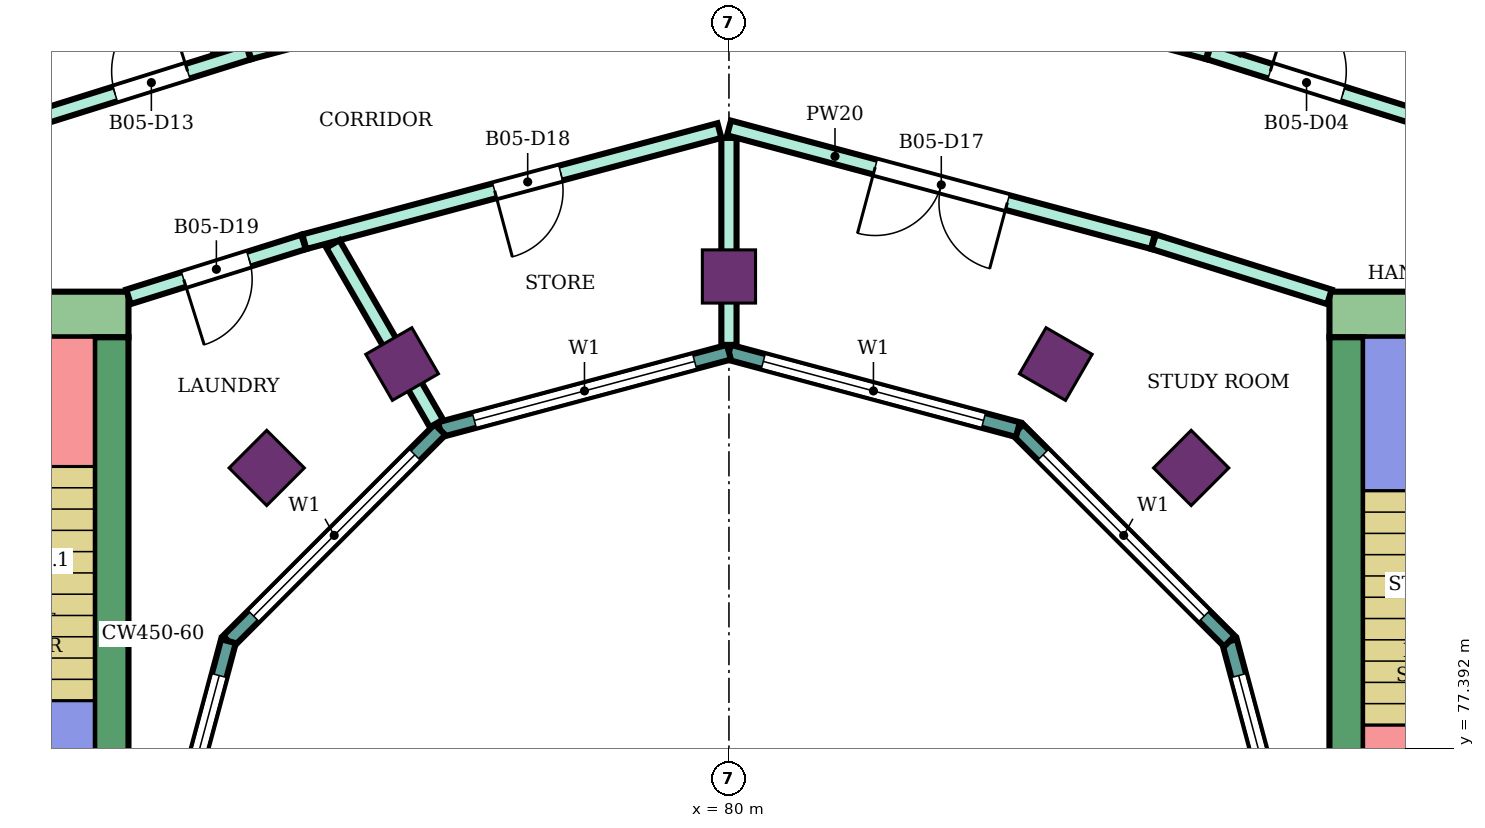
"""IFC4 building model, lengths in metres.
Left out: names, types, materials, properties, quantities, classifications, styles, units other than length and angle.
Written with IfcOpenShell. Run it as: python <this file> out.ifc"""

import sys

from ifc_helpers import new_model, si_unit, direction, frame, frame_2d, origin, origin_2d, place, context, subcontext, project, spatial, rectangle, extrude, element, fill, save


model = new_model("IFC4")
c1 = context("Model", 3, precision=1e-05, world=origin(), true_north=direction((0.0, 1.0)))
c2 = subcontext(c1, "Body", "Model", "MODEL_VIEW")
j1 = project(units=[si_unit("LENGTHUNIT", "METRE"), si_unit("PLANEANGLEUNIT", "RADIAN")], contexts=[c1])
p1 = place(None, origin())
s1 = spatial("IfcSite", under=j1, at=p1, CompositionType="ELEMENT")
p2 = place(p1, origin())
s2 = spatial("IfcBuilding", under=s1, at=p2, CompositionType="ELEMENT")
p3 = place(p2, frame((0.0, 0.0, 262.5)))
s3 = spatial("IfcBuildingStorey", under=s2, at=p3, CompositionType="ELEMENT", Elevation=262.5)
for number, where, z_axis, x_axis in (
    (1, (86.081, 81.081, 0.0), (0.0, 0.0, 1.0), (0.707, 0.707, 0.0)),
    (2, (84.3, 82.448, 0.0), (0.0, 0.0, 1.0), (0.5, 0.866, 0.0)),
    (3, (80.0, 83.6, 0.0), (0.0, 0.0, 1.0), (0.0, 1.0, 0.0)),
    (4, (75.7, 82.448, 0.0), (0.0, 0.0, 1.0), (-0.5, 0.866, 0.0)),
    (5, (73.919, 81.081, 0.0), (0.0, 0.0, 1.0), (-0.707, 0.707, 0.0)),
):
    element("IfcColumn", number, at=place(p3, frame(where, z_axis=z_axis, x_axis=x_axis)), inside=s3, PredefinedType="COLUMN", context=c2, shape_type="SweptSolid", body=[
        extrude(rectangle(XDim=0.7, YDim=0.7, at=origin_2d()), origin(), (0.0, 0.0, 1.0), 4.2),
    ])
p4 = place(p3, frame((87.9, 83.1, 0.0), z_axis=(0.0, 0.0, 1.0), x_axis=(1.0, 0.0, 0.0)))
e6 = element("IfcWall", 6, at=p4, inside=s3, PredefinedType="SHEAR", context=c2, shape_type="SweptSolid", body=[
    extrude(rectangle(XDim=14.9, YDim=0.6, at=frame_2d((7.45, 0.0))), origin(), (0.0, 0.0, 1.0), 3.88),
])
p5 = place(p4, frame((4.2, 0.0, 0.0)))
e7 = element("IfcOpeningElement", 7, at=p5, cuts=e6, PredefinedType="OPENING", context=c2, shape_type="SweptSolid", body=[
    extrude(rectangle(XDim=2.4, YDim=2.4, at=frame_2d((1.2, 1.2))), frame((0.0, 0.31, 0.0), z_axis=(0.0, -1.0, 0.0), x_axis=(1.0, 0.0, 0.0)), (0.0, 0.0, 1.0), 0.62),
])
p6 = place(p3, frame((88.125, 75.0, 0.0), z_axis=(0.0, 0.0, 1.0), x_axis=(0.0, 1.0, 0.0)))
e8 = element("IfcWall", 8, at=p6, inside=s3, PredefinedType="SHEAR", context=c2, shape_type="SweptSolid", body=[
    extrude(rectangle(XDim=7.8, YDim=0.45, at=frame_2d((3.9, 0.0))), origin(), (0.0, 0.0, 1.0), 3.88),
])
p7 = place(p3, frame((72.1, 83.1, 0.0), z_axis=(0.0, 0.0, 1.0), x_axis=(-1.0, 0.0, 0.0)))
e9 = element("IfcWall", 9, at=p7, inside=s3, PredefinedType="SHEAR", context=c2, shape_type="SweptSolid", body=[
    extrude(rectangle(XDim=14.9, YDim=0.6, at=frame_2d((7.45, 0.0))), origin(), (0.0, 0.0, 1.0), 3.88),
])
p8 = place(p7, frame((4.2, 0.0, 0.0)))
e10 = element("IfcOpeningElement", 10, at=p8, cuts=e9, PredefinedType="OPENING", context=c2, shape_type="SweptSolid", body=[
    extrude(rectangle(XDim=2.4, YDim=2.4, at=frame_2d((1.2, 1.2))), frame((0.0, 0.31, 0.0), z_axis=(0.0, -1.0, 0.0), x_axis=(1.0, 0.0, 0.0)), (0.0, 0.0, 1.0), 0.62),
])
p9 = place(p3, frame((71.875, 82.8, 0.0), z_axis=(0.0, 0.0, 1.0), x_axis=(0.0, -1.0, 0.0)))
e11 = element("IfcWall", 11, at=p9, inside=s3, PredefinedType="SHEAR", context=c2, shape_type="SweptSolid", body=[
    extrude(rectangle(XDim=7.8, YDim=0.45, at=frame_2d((3.9, 0.0))), origin(), (0.0, 0.0, 1.0), 3.88),
])
p10 = place(p3, frame((87.604, 75.0, 0.0), z_axis=(0.0, 0.0, 1.0), x_axis=(-0.258789828301, 0.965933654434, 0.0)))
e12 = element("IfcWall", 12, at=p10, inside=s3, PredefinedType="NOTDEFINED", context=c2, shape_type="SweptSolid", body=[
    extrude(rectangle(XDim=3.936, YDim=0.2, at=frame_2d((1.968, 0.0))), origin(), (0.0, 0.0, 1.0), 4.2),
])
p11 = place(p10, frame((0.468, 0.0, 0.9)))
e13 = element("IfcOpeningElement", 13, at=p11, cuts=e12, PredefinedType="OPENING", context=c2, shape_type="SweptSolid", body=[
    extrude(rectangle(XDim=3.0, YDim=2.3, at=frame_2d((1.5, 1.15))), frame((0.0, 0.11, 0.0), z_axis=(0.0, -1.0, 0.0), x_axis=(1.0, 0.0, 0.0)), (0.0, 0.0, 1.0), 0.22),
])
p12 = place(p3, frame((86.585, 78.802, 0.0), z_axis=(0.0, 0.0, 1.0), x_axis=(-0.707106781187, 0.707106781187, 0.0)))
e14 = element("IfcWall", 14, at=p12, inside=s3, PredefinedType="NOTDEFINED", context=c2, shape_type="SweptSolid", body=[
    extrude(rectangle(XDim=3.936, YDim=0.2, at=frame_2d((1.968, 0.0))), origin(), (0.0, 0.0, 1.0), 4.2),
])
p13 = place(p12, frame((0.468, 0.0, 0.9)))
e15 = element("IfcOpeningElement", 15, at=p13, cuts=e14, PredefinedType="OPENING", context=c2, shape_type="SweptSolid", body=[
    extrude(rectangle(XDim=3.0, YDim=2.3, at=frame_2d((1.5, 1.15))), frame((0.0, 0.11, 0.0), z_axis=(0.0, -1.0, 0.0), x_axis=(1.0, 0.0, 0.0)), (0.0, 0.0, 1.0), 0.22),
])
p14 = place(p3, frame((83.802, 81.585, 0.0), z_axis=(0.0, 0.0, 1.0), x_axis=(-0.965933654434, 0.258789828301, 0.0)))
e16 = element("IfcWall", 16, at=p14, inside=s3, PredefinedType="NOTDEFINED", context=c2, shape_type="SweptSolid", body=[
    extrude(rectangle(XDim=3.936, YDim=0.2, at=frame_2d((1.968, 0.0))), origin(), (0.0, 0.0, 1.0), 4.2),
])
p15 = place(p14, frame((0.468, 0.0, 0.9)))
e17 = element("IfcOpeningElement", 17, at=p15, cuts=e16, PredefinedType="OPENING", context=c2, shape_type="SweptSolid", body=[
    extrude(rectangle(XDim=3.0, YDim=2.3, at=frame_2d((1.5, 1.15))), frame((0.0, 0.11, 0.0), z_axis=(0.0, -1.0, 0.0), x_axis=(1.0, 0.0, 0.0)), (0.0, 0.0, 1.0), 0.22),
])
p16 = place(p3, frame((80.0, 82.604, 0.0), z_axis=(0.0, 0.0, 1.0), x_axis=(-0.965933654434, -0.258789828301, 0.0)))
e18 = element("IfcWall", 18, at=p16, inside=s3, PredefinedType="NOTDEFINED", context=c2, shape_type="SweptSolid", body=[
    extrude(rectangle(XDim=3.936, YDim=0.2, at=frame_2d((1.968, 0.0))), origin(), (0.0, 0.0, 1.0), 4.2),
])
p17 = place(p16, frame((0.468, 0.0, 0.9)))
e19 = element("IfcOpeningElement", 19, at=p17, cuts=e18, PredefinedType="OPENING", context=c2, shape_type="SweptSolid", body=[
    extrude(rectangle(XDim=3.0, YDim=2.3, at=frame_2d((1.5, 1.15))), frame((0.0, 0.11, 0.0), z_axis=(0.0, -1.0, 0.0), x_axis=(1.0, 0.0, 0.0)), (0.0, 0.0, 1.0), 0.22),
])
p18 = place(p3, frame((76.198, 81.585, 0.0), z_axis=(0.0, 0.0, 1.0), x_axis=(-0.707106781187, -0.707106781187, 0.0)))
e20 = element("IfcWall", 20, at=p18, inside=s3, PredefinedType="NOTDEFINED", context=c2, shape_type="SweptSolid", body=[
    extrude(rectangle(XDim=3.936, YDim=0.2, at=frame_2d((1.968, 0.0))), origin(), (0.0, 0.0, 1.0), 4.2),
])
p19 = place(p18, frame((0.468, 0.0, 0.9)))
e21 = element("IfcOpeningElement", 21, at=p19, cuts=e20, PredefinedType="OPENING", context=c2, shape_type="SweptSolid", body=[
    extrude(rectangle(XDim=3.0, YDim=2.3, at=frame_2d((1.5, 1.15))), frame((0.0, 0.11, 0.0), z_axis=(0.0, -1.0, 0.0), x_axis=(1.0, 0.0, 0.0)), (0.0, 0.0, 1.0), 0.22),
])
p20 = place(p3, frame((73.415, 78.802, 0.0), z_axis=(0.0, 0.0, 1.0), x_axis=(-0.258789828301, -0.965933654434, 0.0)))
e22 = element("IfcWall", 22, at=p20, inside=s3, PredefinedType="NOTDEFINED", context=c2, shape_type="SweptSolid", body=[
    extrude(rectangle(XDim=3.936, YDim=0.2, at=frame_2d((1.968, 0.0))), origin(), (0.0, 0.0, 1.0), 4.2),
])
p21 = place(p20, frame((0.468, 0.0, 0.9)))
e23 = element("IfcOpeningElement", 23, at=p21, cuts=e22, PredefinedType="OPENING", context=c2, shape_type="SweptSolid", body=[
    extrude(rectangle(XDim=3.0, YDim=2.3, at=frame_2d((1.5, 1.15))), frame((0.0, 0.11, 0.0), z_axis=(0.0, -1.0, 0.0), x_axis=(1.0, 0.0, 0.0)), (0.0, 0.0, 1.0), 0.22),
])
p22 = place(p3, frame((67.104, 97.343, 0.0), z_axis=(0.0, 0.0, 1.0), x_axis=(0.499894524629, -0.866086291455, 0.0)))
e24 = element("IfcWall", 24, at=p22, inside=s3, PredefinedType="PARTITIONING", context=c2, shape_type="SweptSolid", body=[
    extrude(rectangle(XDim=12.446, YDim=0.2, at=frame_2d((6.223, 0.0))), origin(), (0.0, 0.0, 1.0), 3.75),
])
p23 = place(p3, frame((68.2, 84.833, 0.0), z_axis=(0.0, 0.0, 1.0), x_axis=(0.954204109499, 0.299156342762, 0.0)))
e25 = element("IfcWall", 25, at=p23, inside=s3, PredefinedType="PARTITIONING", context=c2, shape_type="SweptSolid", body=[
    extrude(rectangle(XDim=5.74, YDim=0.2, at=frame_2d((2.87, 0.0))), origin(), (0.0, 0.0, 1.0), 3.75),
])
p24 = place(p23, frame((3.903, 0.0, 0.0)))
e26 = element("IfcOpeningElement", 26, at=p24, cuts=e25, PredefinedType="OPENING", context=c2, shape_type="SweptSolid", body=[
    extrude(rectangle(XDim=1.0, YDim=2.1, at=frame_2d((0.5, 1.05))), frame((0.0, 0.11, 0.0), z_axis=(0.0, -1.0, 0.0), x_axis=(1.0, 0.0, 0.0)), (0.0, 0.0, 1.0), 0.22),
])
p25 = place(p3, frame((72.1, 83.332, 0.0), z_axis=(0.0, 0.0, 1.0), x_axis=(0.954233106619, 0.299063836383, 0.0)))
e27 = element("IfcWall", 27, at=p25, inside=s3, PredefinedType="PARTITIONING", context=c2, shape_type="SweptSolid", body=[
    extrude(rectangle(XDim=2.414, YDim=0.2, at=frame_2d((1.207, 0.0))), origin(), (0.0, 0.0, 1.0), 3.75),
])
p26 = place(p25, frame((0.762, 0.0, 0.0)))
e28 = element("IfcOpeningElement", 28, at=p26, cuts=e27, PredefinedType="OPENING", context=c2, shape_type="SweptSolid", body=[
    extrude(rectangle(XDim=0.9, YDim=2.1, at=frame_2d((0.45, 1.05))), frame((0.0, 0.11, 0.0), z_axis=(0.0, -1.0, 0.0), x_axis=(1.0, 0.0, 0.0)), (0.0, 0.0, 1.0), 0.22),
])
p27 = place(p3, frame((73.687, 86.554, 0.0), z_axis=(0.0, 0.0, 1.0), x_axis=(0.965961994098, 0.258684027257, 0.0)))
e29 = element("IfcWall", 29, at=p27, inside=s3, PredefinedType="PARTITIONING", context=c2, shape_type="SweptSolid", body=[
    extrude(rectangle(XDim=6.486, YDim=0.2, at=frame_2d((3.243, 0.0))), origin(), (0.0, 0.0, 1.0), 3.75),
])
p28 = place(p3, frame((74.413, 84.057, 0.0), z_axis=(0.0, 0.0, 1.0), x_axis=(0.965972135939, 0.258646153246, 0.0)))
e30 = element("IfcWall", 30, at=p28, inside=s3, PredefinedType="PARTITIONING", context=c2, shape_type="SweptSolid", body=[
    extrude(rectangle(XDim=5.654, YDim=0.2, at=frame_2d((2.827, 0.0))), origin(), (0.0, 0.0, 1.0), 3.75),
])
p29 = place(p28, frame((2.593, 0.0, 0.0)))
e31 = element("IfcOpeningElement", 31, at=p29, cuts=e30, PredefinedType="OPENING", context=c2, shape_type="SweptSolid", body=[
    extrude(rectangle(XDim=0.9, YDim=2.1, at=frame_2d((0.45, 1.05))), frame((0.0, 0.11, 0.0), z_axis=(0.0, -1.0, 0.0), x_axis=(1.0, 0.0, 0.0)), (0.0, 0.0, 1.0), 0.22),
])
p30 = place(p3, frame((74.789, 84.028, 0.0), z_axis=(0.0, 0.0, 1.0), x_axis=(0.499905962189, -0.866079689733, 0.0)))
e32 = element("IfcWall", 32, at=p30, inside=s3, PredefinedType="PARTITIONING", context=c2, shape_type="SweptSolid", body=[
    extrude(rectangle(XDim=2.726, YDim=0.2, at=frame_2d((1.363, 0.0))), origin(), (0.0, 0.0, 1.0), 3.75),
])
p31 = place(p3, frame((80.0, 82.7, 0.0), z_axis=(0.0, 0.0, 1.0), x_axis=(0.0, 1.0, 0.0)))
e33 = element("IfcWall", 33, at=p31, inside=s3, PredefinedType="PARTITIONING", context=c2, shape_type="SweptSolid", body=[
    extrude(rectangle(XDim=2.723, YDim=0.2, at=frame_2d((1.362, 0.0))), origin(), (0.0, 0.0, 1.0), 3.75),
])
p32 = place(p3, frame((80.048, 88.233, 0.0), z_axis=(0.0, 0.0, 1.0), x_axis=(0.965867917069, -0.259035068625, 0.0)))
e34 = element("IfcWall", 34, at=p32, inside=s3, PredefinedType="PARTITIONING", context=c2, shape_type="SweptSolid", body=[
    extrude(rectangle(XDim=6.476, YDim=0.2, at=frame_2d((3.238, 0.0))), origin(), (0.0, 0.0, 1.0), 3.75),
])
p33 = place(p32, frame((0.5, 0.0, 0.0)))
e35 = element("IfcOpeningElement", 35, at=p33, cuts=e34, PredefinedType="OPENING", context=c2, shape_type="SweptSolid", body=[
    extrude(rectangle(XDim=1.0, YDim=2.1, at=frame_2d((0.5, 1.05))), frame((0.0, 0.11, 0.0), z_axis=(0.0, -1.0, 0.0), x_axis=(1.0, 0.0, 0.0)), (0.0, 0.0, 1.0), 0.22),
])
p34 = place(p3, frame((80.001, 85.554, 0.0), z_axis=(0.0, 0.0, 1.0), x_axis=(0.965917658836, -0.258849524528, 0.0)))
e36 = element("IfcWall", 36, at=p34, inside=s3, PredefinedType="PARTITIONING", context=c2, shape_type="SweptSolid", body=[
    extrude(rectangle(XDim=5.773, YDim=0.2, at=frame_2d((2.887, 0.0))), origin(), (0.0, 0.0, 1.0), 3.75),
])
p35 = place(p34, frame((1.991, 0.0, 0.0)))
e37 = element("IfcOpeningElement", 37, at=p35, cuts=e36, PredefinedType="OPENING", context=c2, shape_type="SweptSolid", body=[
    extrude(rectangle(XDim=1.8, YDim=2.1, at=frame_2d((0.9, 1.05))), frame((0.0, 0.11, 0.0), z_axis=(0.0, -1.0, 0.0), x_axis=(1.0, 0.0, 0.0)), (0.0, 0.0, 1.0), 0.22),
])
p36 = place(p3, frame((85.587, 84.057, 0.0), z_axis=(0.0, 0.0, 1.0), x_axis=(0.954210767728, -0.299135104513, 0.0)))
e38 = element("IfcWall", 38, at=p36, inside=s3, PredefinedType="PARTITIONING", context=c2, shape_type="SweptSolid", body=[
    extrude(rectangle(XDim=2.424, YDim=0.2, at=frame_2d((1.212, 0.0))), origin(), (0.0, 0.0, 1.0), 3.75),
])
p37 = place(p3, frame((86.313, 86.554, 0.0), z_axis=(0.0, 0.0, 1.0), x_axis=(0.954081217458, -0.299548043717, 0.0)))
e39 = element("IfcWall", 39, at=p37, inside=s3, PredefinedType="PARTITIONING", context=c2, shape_type="SweptSolid", body=[
    extrude(rectangle(XDim=5.721, YDim=0.2, at=frame_2d((2.86, 0.0))), origin(), (0.0, 0.0, 1.0), 3.75),
])
p38 = place(p37, frame((0.848, 0.0, 0.0)))
e40 = element("IfcOpeningElement", 40, at=p38, cuts=e39, PredefinedType="OPENING", context=c2, shape_type="SweptSolid", body=[
    extrude(rectangle(XDim=1.0, YDim=2.1, at=frame_2d((0.5, 1.05))), frame((0.0, 0.11, 0.0), z_axis=(0.0, -1.0, 0.0), x_axis=(1.0, 0.0, 0.0)), (0.0, 0.0, 1.0), 0.22),
])
p39 = place(p3, frame((86.671, 86.554, 0.0), z_axis=(0.0, 0.0, 1.0), x_axis=(0.500005228967, 0.866022384818, 0.0)))
e41 = element("IfcWall", 41, at=p39, inside=s3, PredefinedType="PARTITIONING", context=c2, shape_type="SweptSolid", body=[
    extrude(rectangle(XDim=12.456, YDim=0.1, at=frame_2d((6.228, 0.0))), origin(), (0.0, 0.0, 1.0), 3.75),
])
p40 = place(p39, frame((7.196, 0.0, 0.0)))
e42 = element("IfcOpeningElement", 42, at=p40, cuts=e41, PredefinedType="OPENING", context=c2, shape_type="SweptSolid", body=[
    extrude(rectangle(XDim=0.9, YDim=2.1, at=frame_2d((0.45, 1.05))), frame((0.0, 0.06, 0.0), z_axis=(0.0, -1.0, 0.0), x_axis=(1.0, 0.0, 0.0)), (0.0, 0.0, 1.0), 0.12),
])
p41 = place(p11, origin())
e43 = element("IfcWindow", 43, at=p41, inside=s3, PartitioningType="SINGLE_PANEL", PredefinedType="WINDOW", context=c2, shape_type="SweptSolid", body=[
    extrude(rectangle(XDim=3.0, YDim=2.3, at=frame_2d((1.5, 1.15))), frame((0.0, 0.03, 0.0), z_axis=(0.0, -1.0, 0.0), x_axis=(1.0, 0.0, 0.0)), (0.0, 0.0, 1.0), 0.06),
])
fill(e13, e43)
p42 = place(p13, origin())
e44 = element("IfcWindow", 44, at=p42, inside=s3, PartitioningType="SINGLE_PANEL", PredefinedType="WINDOW", context=c2, shape_type="SweptSolid", body=[
    extrude(rectangle(XDim=3.0, YDim=2.3, at=frame_2d((1.5, 1.15))), frame((0.0, 0.03, 0.0), z_axis=(0.0, -1.0, 0.0), x_axis=(1.0, 0.0, 0.0)), (0.0, 0.0, 1.0), 0.06),
])
fill(e15, e44)
p43 = place(p15, origin())
e45 = element("IfcWindow", 45, at=p43, inside=s3, PartitioningType="SINGLE_PANEL", PredefinedType="WINDOW", context=c2, shape_type="SweptSolid", body=[
    extrude(rectangle(XDim=3.0, YDim=2.3, at=frame_2d((1.5, 1.15))), frame((0.0, 0.03, 0.0), z_axis=(0.0, -1.0, 0.0), x_axis=(1.0, 0.0, 0.0)), (0.0, 0.0, 1.0), 0.06),
])
fill(e17, e45)
p44 = place(p17, origin())
e46 = element("IfcWindow", 46, at=p44, inside=s3, PartitioningType="SINGLE_PANEL", PredefinedType="WINDOW", context=c2, shape_type="SweptSolid", body=[
    extrude(rectangle(XDim=3.0, YDim=2.3, at=frame_2d((1.5, 1.15))), frame((0.0, 0.03, 0.0), z_axis=(0.0, -1.0, 0.0), x_axis=(1.0, 0.0, 0.0)), (0.0, 0.0, 1.0), 0.06),
])
fill(e19, e46)
p45 = place(p19, origin())
e47 = element("IfcWindow", 47, at=p45, inside=s3, PartitioningType="SINGLE_PANEL", PredefinedType="WINDOW", context=c2, shape_type="SweptSolid", body=[
    extrude(rectangle(XDim=3.0, YDim=2.3, at=frame_2d((1.5, 1.15))), frame((0.0, 0.03, 0.0), z_axis=(0.0, -1.0, 0.0), x_axis=(1.0, 0.0, 0.0)), (0.0, 0.0, 1.0), 0.06),
])
fill(e21, e47)
p46 = place(p21, origin())
e48 = element("IfcWindow", 48, at=p46, inside=s3, PartitioningType="SINGLE_PANEL", PredefinedType="WINDOW", context=c2, shape_type="SweptSolid", body=[
    extrude(rectangle(XDim=3.0, YDim=2.3, at=frame_2d((1.5, 1.15))), frame((0.0, 0.03, 0.0), z_axis=(0.0, -1.0, 0.0), x_axis=(1.0, 0.0, 0.0)), (0.0, 0.0, 1.0), 0.06),
])
fill(e23, e48)
p47 = place(p38, origin())
e49 = element("IfcDoor", 49, at=p47, inside=s3, OperationType="SINGLE_SWING_LEFT", PredefinedType="DOOR", context=c2, shape_type="SweptSolid", body=[
    extrude(rectangle(XDim=1.0, YDim=2.1, at=frame_2d((0.5, 1.05))), frame((0.0, 0.025, 0.0), z_axis=(0.0, -1.0, 0.0), x_axis=(1.0, 0.0, 0.0)), (0.0, 0.0, 1.0), 0.05),
])
fill(e40, e49)
p48 = place(p24, origin())
e50 = element("IfcDoor", 50, at=p48, inside=s3, OperationType="SINGLE_SWING_RIGHT", PredefinedType="DOOR", context=c2, shape_type="SweptSolid", body=[
    extrude(rectangle(XDim=1.0, YDim=2.1, at=frame_2d((0.5, 1.05))), frame((0.0, 0.025, 0.0), z_axis=(0.0, -1.0, 0.0), x_axis=(1.0, 0.0, 0.0)), (0.0, 0.0, 1.0), 0.05),
])
fill(e26, e50)
p49 = place(p35, frame((1.8, 0.0, 0.0), z_axis=(0.0, 0.0, 1.0), x_axis=(-1.0, 0.0, 0.0)))
e51 = element("IfcDoor", 51, at=p49, inside=s3, OperationType="DOUBLE_DOOR_SINGLE_SWING", PredefinedType="DOOR", context=c2, shape_type="SweptSolid", body=[
    extrude(rectangle(XDim=1.8, YDim=2.1, at=frame_2d((0.9, 1.05))), frame((0.0, 0.025, 0.0), z_axis=(0.0, -1.0, 0.0), x_axis=(1.0, 0.0, 0.0)), (0.0, 0.0, 1.0), 0.05),
])
fill(e37, e51)
p50 = place(p29, frame((0.9, 0.0, 0.0), z_axis=(0.0, 0.0, 1.0), x_axis=(-1.0, 0.0, 0.0)))
e52 = element("IfcDoor", 52, at=p50, inside=s3, OperationType="SINGLE_SWING_RIGHT", PredefinedType="DOOR", context=c2, shape_type="SweptSolid", body=[
    extrude(rectangle(XDim=0.9, YDim=2.1, at=frame_2d((0.45, 1.05))), frame((0.0, 0.025, 0.0), z_axis=(0.0, -1.0, 0.0), x_axis=(1.0, 0.0, 0.0)), (0.0, 0.0, 1.0), 0.05),
])
fill(e31, e52)
p51 = place(p26, frame((0.9, 0.0, 0.0), z_axis=(0.0, 0.0, 1.0), x_axis=(-1.0, 0.0, 0.0)))
e53 = element("IfcDoor", 53, at=p51, inside=s3, OperationType="SINGLE_SWING_RIGHT", PredefinedType="DOOR", context=c2, shape_type="SweptSolid", body=[
    extrude(rectangle(XDim=0.9, YDim=2.1, at=frame_2d((0.45, 1.05))), frame((0.0, 0.025, 0.0), z_axis=(0.0, -1.0, 0.0), x_axis=(1.0, 0.0, 0.0)), (0.0, 0.0, 1.0), 0.05),
])
fill(e28, e53)
save(model, sys.argv[1])
